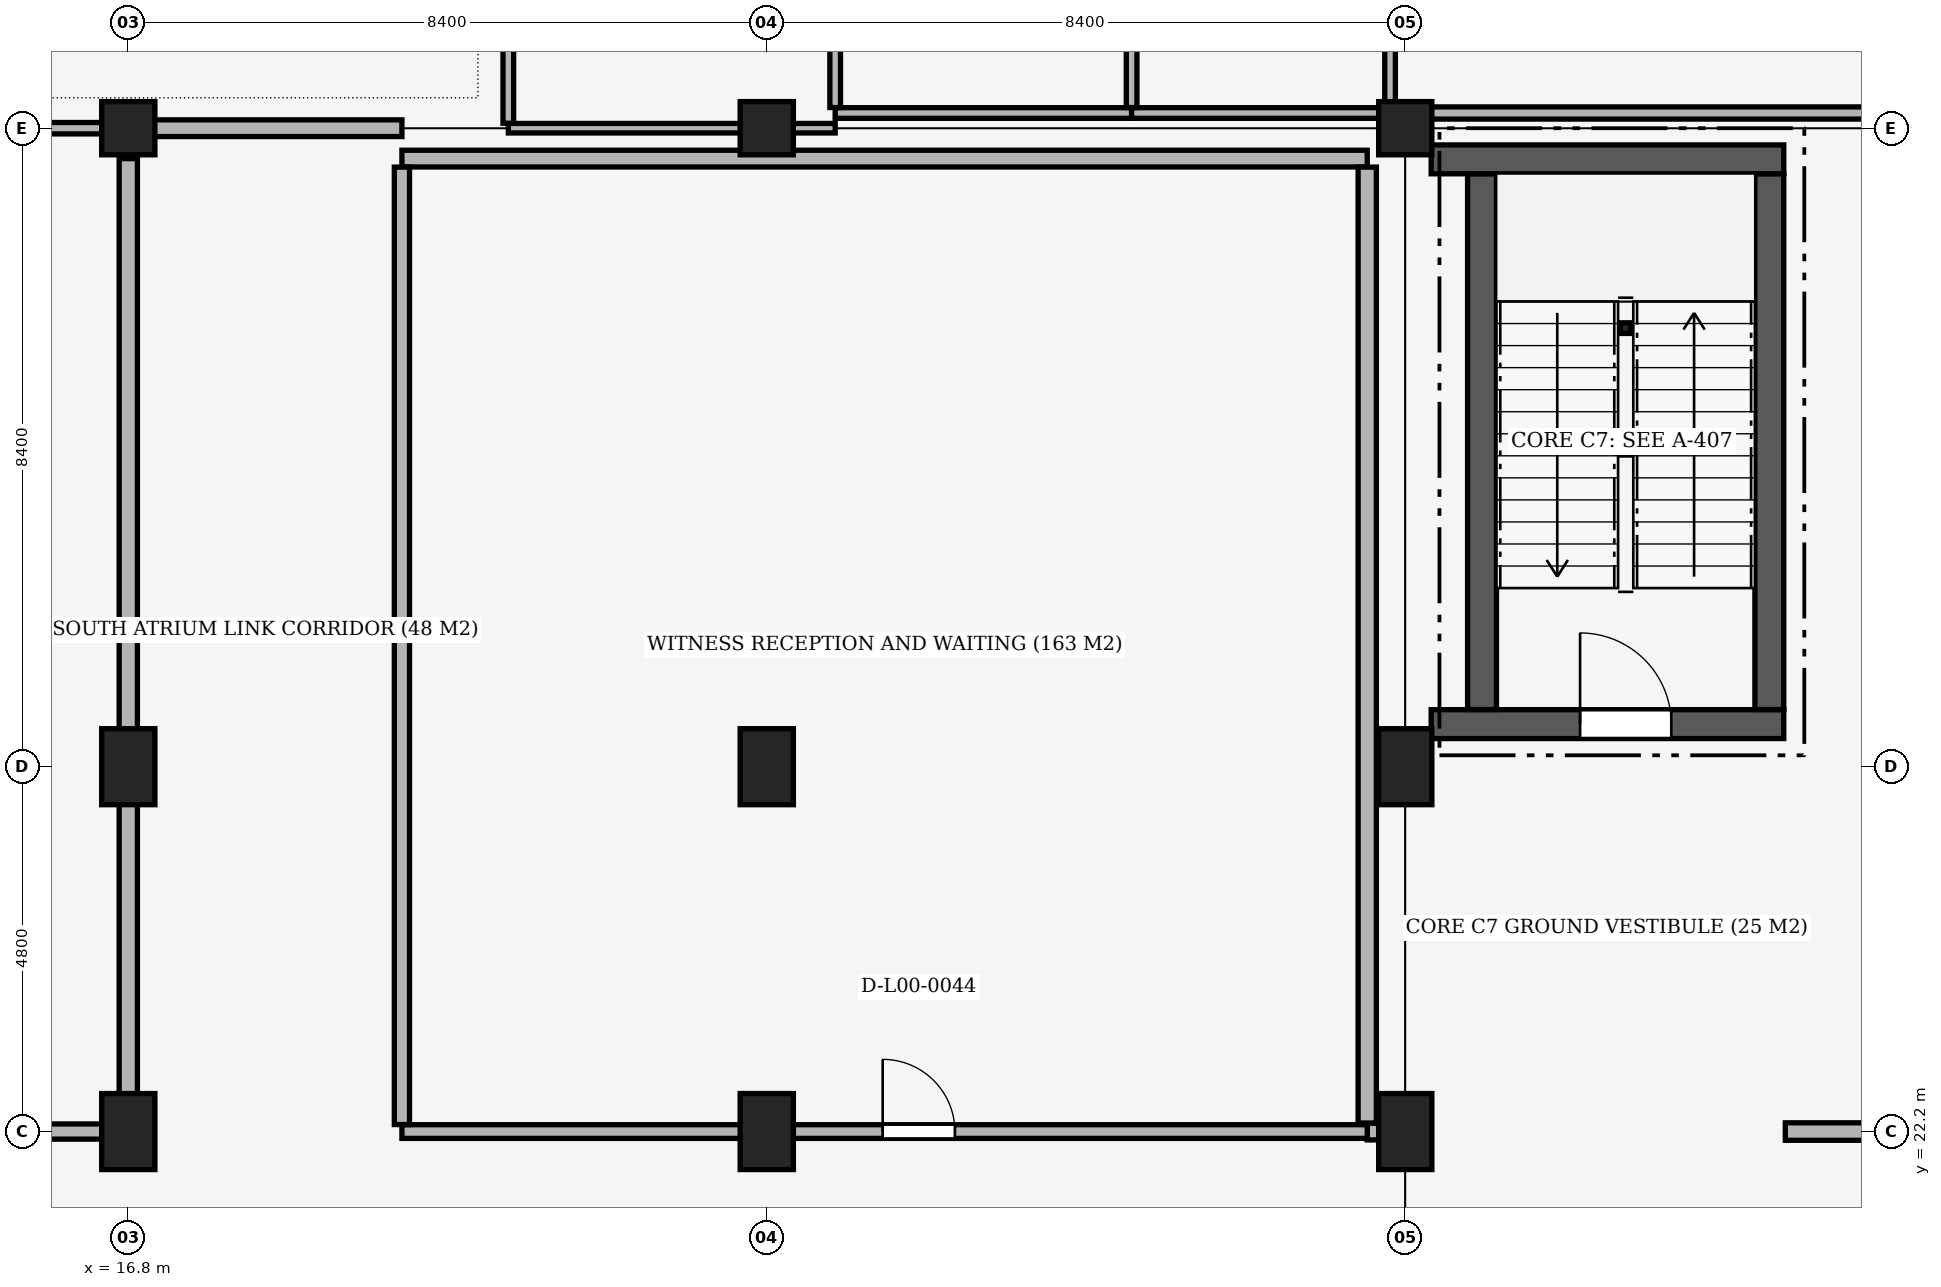
"""IFC4 building model, lengths in metres.
Left out: names, types, materials, properties, quantities, classifications, styles, units other than length and angle.
Written with IfcOpenShell. Run it as: python <this file> out.ifc"""

import sys

from ifc_helpers import new_model, si_unit, direction, frame, frame_2d, origin, origin_2d, place, context, subcontext, project, spatial, rectangle, hollow_circle, extrude, element, fill, save


model = new_model("IFC4")
c1 = context("Model", 3, precision=1e-05, world=origin(), true_north=direction((0.0, 1.0)))
c2 = subcontext(c1, "Body", "Model", "MODEL_VIEW")
j1 = project(units=[si_unit("LENGTHUNIT", "METRE"), si_unit("PLANEANGLEUNIT", "RADIAN")], contexts=[c1])
p1 = place(None, origin())
s1 = spatial("IfcSite", under=j1, at=p1, CompositionType="ELEMENT")
p2 = place(p1, origin())
s2 = spatial("IfcBuilding", under=s1, at=p2, CompositionType="ELEMENT")
p3 = place(p2, origin())
s3 = spatial("IfcBuildingStorey", under=s2, at=p3, CompositionType="ELEMENT", Elevation=0.0)
for number, where, z_axis, x_axis in (
    (1, (16.8, 22.2, 0.0), (0.0, 0.0, 1.0), (1.0, 0.0, 0.0)),
    (2, (16.8, 27.0, 0.0), (0.0, 0.0, 1.0), (1.0, 0.0, 0.0)),
):
    element("IfcColumn", number, at=place(p3, frame(where, z_axis=z_axis, x_axis=x_axis)), inside=s3, PredefinedType="COLUMN", context=c2, shape_type="SweptSolid", body=[
        extrude(rectangle(XDim=0.7, YDim=1.0, at=origin_2d()), origin(), (0.0, 0.0, 1.0), 5.1),
    ])
p4 = place(p3, frame((16.8, 35.4, 0.0), z_axis=(0.0, 0.0, 1.0), x_axis=(1.0, 0.0, 0.0)))
e3 = element("IfcColumn", 3, at=p4, inside=s3, PredefinedType="COLUMN", context=c2, shape_type="SweptSolid", body=[
    extrude(rectangle(XDim=0.7, YDim=0.7, at=origin_2d()), origin(), (0.0, 0.0, 1.0), 5.1),
])
for number, where, z_axis, x_axis in (
    (4, (25.2, 22.2, 0.0), (0.0, 0.0, 1.0), (1.0, 0.0, 0.0)),
    (5, (25.2, 27.0, 0.0), (0.0, 0.0, 1.0), (1.0, 0.0, 0.0)),
):
    element("IfcColumn", number, at=place(p3, frame(where, z_axis=z_axis, x_axis=x_axis)), inside=s3, PredefinedType="COLUMN", context=c2, shape_type="SweptSolid", body=[
        extrude(rectangle(XDim=0.7, YDim=1.0, at=origin_2d()), origin(), (0.0, 0.0, 1.0), 5.1),
    ])
p5 = place(p3, frame((25.2, 35.4, 0.0), z_axis=(0.0, 0.0, 1.0), x_axis=(1.0, 0.0, 0.0)))
e6 = element("IfcColumn", 6, at=p5, inside=s3, PredefinedType="COLUMN", context=c2, shape_type="SweptSolid", body=[
    extrude(rectangle(XDim=0.7, YDim=0.7, at=origin_2d()), origin(), (0.0, 0.0, 1.0), 5.1),
])
for number, where, z_axis, x_axis in (
    (7, (33.6, 22.2, 0.0), (0.0, 0.0, 1.0), (1.0, 0.0, 0.0)),
    (8, (33.6, 27.0, 0.0), (0.0, 0.0, 1.0), (1.0, 0.0, 0.0)),
):
    element("IfcColumn", number, at=place(p3, frame(where, z_axis=z_axis, x_axis=x_axis)), inside=s3, PredefinedType="COLUMN", context=c2, shape_type="SweptSolid", body=[
        extrude(rectangle(XDim=0.7, YDim=1.0, at=origin_2d()), origin(), (0.0, 0.0, 1.0), 5.1),
    ])
p6 = place(p3, frame((33.6, 35.4, 0.0), z_axis=(0.0, 0.0, 1.0), x_axis=(1.0, 0.0, 0.0)))
e9 = element("IfcColumn", 9, at=p6, inside=s3, PredefinedType="COLUMN", context=c2, shape_type="SweptSolid", body=[
    extrude(rectangle(XDim=0.7, YDim=0.7, at=origin_2d()), origin(), (0.0, 0.0, 1.0), 5.1),
])
for number, where, z_axis, x_axis in (
    (10, (36.5, 32.77, 0.0), (0.0, 0.0, 1.0), (1.0, 0.0, 0.0)),
    (11, (36.5, 31.17, 0.0), (0.0, 0.0, 1.0), (1.0, 0.0, 0.0)),
):
    element("IfcColumn", number, at=place(p3, frame(where, z_axis=z_axis, x_axis=x_axis)), inside=s3, PredefinedType="COLUMN", context=c2, shape_type="SweptSolid", body=[
        extrude(hollow_circle(Radius=0.07, WallThickness=0.008, at=origin_2d()), origin(), (0.0, 0.0, 1.0), 2.12),
    ])
p7 = place(p3, frame((33.941, 34.99, 0.0), z_axis=(0.0, 0.0, 1.0), x_axis=(1.0, 0.0, 0.0)))
e12 = element("IfcWall", 12, at=p7, inside=s3, PredefinedType="SHEAR", context=c2, shape_type="SweptSolid", body=[
    extrude(rectangle(XDim=4.639, YDim=0.38, at=frame_2d((2.32, 0.0))), origin(), (0.0, 0.0, 1.0), 4.82),
])
p8 = place(p3, frame((33.941, 27.56, 0.0), z_axis=(0.0, 0.0, 1.0), x_axis=(1.0, 0.0, 0.0)))
e13 = element("IfcWall", 13, at=p8, inside=s3, PredefinedType="SHEAR", context=c2, shape_type="SweptSolid", body=[
    extrude(rectangle(XDim=4.639, YDim=0.38, at=frame_2d((2.32, 0.0))), origin(), (0.0, 0.0, 1.0), 4.82),
])
p9 = place(p8, frame((1.959, 0.0, 0.0)))
e14 = element("IfcOpeningElement", 14, at=p9, cuts=e13, PredefinedType="OPENING", context=c2, shape_type="SweptSolid", body=[
    extrude(rectangle(XDim=1.2, YDim=2.2, at=frame_2d((0.6, 1.1))), frame((0.0, 0.205, 0.0), z_axis=(0.0, -1.0, 0.0), x_axis=(1.0, 0.0, 0.0)), (0.0, 0.0, 1.0), 0.41),
])
for number, where, z_axis, x_axis in (
    (15, (34.61, 27.752, 0.0), (0.0, 0.0, 1.0), (0.0, 1.0, 0.0)),
    (16, (38.39, 27.752, 0.0), (0.0, 0.0, 1.0), (0.0, 1.0, 0.0)),
):
    element("IfcWall", number, at=place(p3, frame(where, z_axis=z_axis, x_axis=x_axis)), inside=s3, PredefinedType="SHEAR", context=c2, shape_type="SweptSolid", body=[
        extrude(rectangle(XDim=7.046, YDim=0.38, at=frame_2d((3.523, 0.0))), origin(), (0.0, 0.0, 1.0), 4.82),
    ])
p10 = place(p3, frame((33.1, 22.2, 0.0), z_axis=(0.0, 0.0, 1.0), x_axis=(1.0, 0.0, 0.0)))
e17 = element("IfcWall", 17, at=p10, inside=s3, PredefinedType="PARTITIONING", context=c2, shape_type="SweptSolid", body=[
    extrude(rectangle(XDim=0.5, YDim=0.22, at=frame_2d((0.25, 0.0))), origin(), (0.0, 0.0, 1.0), 4.07),
])
p11 = place(p3, frame((0.5, 22.2, 0.0), z_axis=(0.0, 0.0, 1.0), x_axis=(1.0, 0.0, 0.0)))
e18 = element("IfcWall", 18, at=p11, inside=s3, PredefinedType="PARTITIONING", context=c2, shape_type="SweptSolid", body=[
    extrude(rectangle(XDim=16.3, YDim=0.2, at=frame_2d((8.15, 0.0))), origin(), (0.0, 0.0, 1.0), 4.07),
])
p12 = place(p11, frame((5.65, 0.0, 0.0)))
e19 = element("IfcOpeningElement", 19, at=p12, cuts=e18, PredefinedType="OPENING", context=c2, shape_type="SweptSolid", body=[
    extrude(rectangle(XDim=1.0, YDim=2.2, at=frame_2d((0.5, 1.1))), frame((0.0, 0.115, 0.0), z_axis=(0.0, -1.0, 0.0), x_axis=(1.0, 0.0, 0.0)), (0.0, 0.0, 1.0), 0.23),
])
p13 = place(p3, frame((20.4, 22.2, 0.0), z_axis=(0.0, 0.0, 1.0), x_axis=(1.0, 0.0, 0.0)))
e20 = element("IfcWall", 20, at=p13, inside=s3, PredefinedType="PARTITIONING", context=c2, shape_type="SweptSolid", body=[
    extrude(rectangle(XDim=12.7, YDim=0.18, at=frame_2d((6.35, 0.0))), origin(), (0.0, 0.0, 1.0), 4.07),
])
p14 = place(p13, frame((6.325, 0.0, 0.0)))
e21 = element("IfcOpeningElement", 21, at=p14, cuts=e20, PredefinedType="OPENING", context=c2, shape_type="SweptSolid", body=[
    extrude(rectangle(XDim=0.95, YDim=2.1, at=frame_2d((0.475, 1.05))), frame((0.0, 0.105, 0.0), z_axis=(0.0, -1.0, 0.0), x_axis=(1.0, 0.0, 0.0)), (0.0, 0.0, 1.0), 0.21),
])
p15 = place(p3, frame((38.6, 22.2, 0.0), z_axis=(0.0, 0.0, 1.0), x_axis=(1.0, 0.0, 0.0)))
e22 = element("IfcWall", 22, at=p15, inside=s3, PredefinedType="SOLIDWALL", context=c2, shape_type="SweptSolid", body=[
    extrude(rectangle(XDim=20.7, YDim=0.23, at=frame_2d((10.35, 0.0))), origin(), (0.0, 0.0, 1.0), 4.07),
])
p16 = place(p15, frame((9.425, 0.0, 0.0)))
e23 = element("IfcOpeningElement", 23, at=p16, cuts=e22, PredefinedType="OPENING", context=c2, shape_type="SweptSolid", body=[
    extrude(rectangle(XDim=0.95, YDim=2.1, at=frame_2d((0.475, 1.05))), frame((0.0, 0.13, 0.0), z_axis=(0.0, -1.0, 0.0), x_axis=(1.0, 0.0, 0.0)), (0.0, 0.0, 1.0), 0.26),
])
p17 = place(p3, frame((20.4, 35.0, 0.0), z_axis=(0.0, 0.0, 1.0), x_axis=(1.0, 0.0, 0.0)))
e24 = element("IfcWall", 24, at=p17, inside=s3, PredefinedType="PARTITIONING", context=c2, shape_type="SweptSolid", body=[
    extrude(rectangle(XDim=12.7, YDim=0.22, at=frame_2d((6.35, 0.0))), origin(), (0.0, 0.0, 1.0), 4.02),
])
p18 = place(p3, frame((16.8, 35.4, 0.0), z_axis=(0.0, 0.0, 1.0), x_axis=(1.0, 0.0, 0.0)))
e25 = element("IfcWall", 25, at=p18, inside=s3, PredefinedType="PARTITIONING", context=c2, shape_type="SweptSolid", body=[
    extrude(rectangle(XDim=3.6, YDim=0.22, at=frame_2d((1.8, 0.0))), origin(), (0.0, 0.0, 1.0), 4.07),
])
p19 = place(p3, frame((8.425, 35.4, 0.0), z_axis=(0.0, 0.0, 1.0), x_axis=(1.0, 0.0, 0.0)))
e26 = element("IfcWall", 26, at=p19, inside=s3, PredefinedType="PARTITIONING", context=c2, shape_type="SweptSolid", body=[
    extrude(rectangle(XDim=8.375, YDim=0.15, at=frame_2d((4.188, 0.0))), origin(), (0.0, 0.0, 1.0), 4.07),
])
p20 = place(p3, frame((21.8, 35.4, 0.0), z_axis=(0.0, 0.0, 1.0), x_axis=(1.0, 0.0, 0.0)))
e27 = element("IfcWall", 27, at=p20, inside=s3, PredefinedType="PARTITIONING", context=c2, shape_type="SweptSolid", body=[
    extrude(rectangle(XDim=4.3, YDim=0.125, at=frame_2d((2.15, 0.0))), origin(), (0.0, 0.0, 1.0), 4.07),
])
p21 = place(p3, frame((26.1, 35.6, 0.0), z_axis=(0.0, 0.0, 1.0), x_axis=(1.0, 0.0, 0.0)))
e28 = element("IfcWall", 28, at=p21, inside=s3, PredefinedType="PARTITIONING", context=c2, shape_type="SweptSolid", body=[
    extrude(rectangle(XDim=3.9, YDim=0.14, at=frame_2d((1.95, 0.0))), origin(), (0.0, 0.0, 1.0), 4.07),
])
p22 = place(p3, frame((30.0, 35.6, 0.0), z_axis=(0.0, 0.0, 1.0), x_axis=(1.0, 0.0, 0.0)))
e29 = element("IfcWall", 29, at=p22, inside=s3, PredefinedType="PARTITIONING", context=c2, shape_type="SweptSolid", body=[
    extrude(rectangle(XDim=3.4, YDim=0.14, at=frame_2d((1.7, 0.0))), origin(), (0.0, 0.0, 1.0), 4.07),
])
p23 = place(p3, frame((33.4, 35.6, 0.0), z_axis=(0.0, 0.0, 1.0), x_axis=(1.0, 0.0, 0.0)))
e30 = element("IfcWall", 30, at=p23, inside=s3, PredefinedType="PARTITIONING", context=c2, shape_type="SweptSolid", body=[
    extrude(rectangle(XDim=8.477, YDim=0.16, at=frame_2d((4.239, 0.0))), origin(), (0.0, 0.0, 1.0), 4.07),
])
p24 = place(p3, frame((16.8, 22.302, 0.0), z_axis=(0.0, 0.0, 1.0), x_axis=(0.0, 1.0, 0.0)))
e31 = element("IfcWall", 31, at=p24, inside=s3, PredefinedType="PARTITIONING", context=c2, shape_type="SweptSolid", body=[
    extrude(rectangle(XDim=12.698, YDim=0.24, at=frame_2d((6.349, 0.0))), origin(), (0.0, 0.0, 1.0), 4.02),
])
p25 = place(p3, frame((20.4, 22.292, 0.0), z_axis=(0.0, 0.0, 1.0), x_axis=(0.0, 1.0, 0.0)))
e32 = element("IfcWall", 32, at=p25, inside=s3, PredefinedType="PARTITIONING", context=c2, shape_type="SweptSolid", body=[
    extrude(rectangle(XDim=12.596, YDim=0.2, at=frame_2d((6.298, 0.0))), origin(), (0.0, 0.0, 1.0), 4.07),
])
p26 = place(p3, frame((21.8, 35.465, 0.0), z_axis=(0.0, 0.0, 1.0), x_axis=(0.0, 1.0, 0.0)))
e33 = element("IfcWall", 33, at=p26, inside=s3, PredefinedType="PARTITIONING", context=c2, shape_type="SweptSolid", body=[
    extrude(rectangle(XDim=13.458, YDim=0.14, at=frame_2d((6.729, 0.0))), origin(), (0.0, 0.0, 1.0), 4.07),
])
p27 = place(p26, frame((5.929, 0.0, 0.0)))
e34 = element("IfcOpeningElement", 34, at=p27, cuts=e33, PredefinedType="OPENING", context=c2, shape_type="SweptSolid", body=[
    extrude(rectangle(XDim=1.6, YDim=2.3, at=frame_2d((0.8, 1.15))), frame((0.0, 0.085, 0.0), z_axis=(0.0, -1.0, 0.0), x_axis=(1.0, 0.0, 0.0)), (0.0, 0.0, 1.0), 0.17),
])
p28 = place(p3, frame((26.1, 35.672, 0.0), z_axis=(0.0, 0.0, 1.0), x_axis=(0.0, 1.0, 0.0)))
e35 = element("IfcWall", 35, at=p28, inside=s3, PredefinedType="PARTITIONING", context=c2, shape_type="SweptSolid", body=[
    extrude(rectangle(XDim=3.328, YDim=0.14, at=frame_2d((1.664, 0.0))), origin(), (0.0, 0.0, 1.0), 4.07),
])
p29 = place(p28, frame((1.214, 0.0, 0.0)))
e36 = element("IfcOpeningElement", 36, at=p29, cuts=e35, PredefinedType="OPENING", context=c2, shape_type="SweptSolid", body=[
    extrude(rectangle(XDim=0.9, YDim=2.1, at=frame_2d((0.45, 1.05))), frame((0.0, 0.085, 0.0), z_axis=(0.0, -1.0, 0.0), x_axis=(1.0, 0.0, 0.0)), (0.0, 0.0, 1.0), 0.17),
])
p30 = place(p3, frame((30.0, 35.672, 0.0), z_axis=(0.0, 0.0, 1.0), x_axis=(0.0, 1.0, 0.0)))
e37 = element("IfcWall", 37, at=p30, inside=s3, PredefinedType="PARTITIONING", context=c2, shape_type="SweptSolid", body=[
    extrude(rectangle(XDim=3.256, YDim=0.14, at=frame_2d((1.628, 0.0))), origin(), (0.0, 0.0, 1.0), 4.07),
])
p31 = place(p3, frame((33.1, 22.312, 0.0), z_axis=(0.0, 0.0, 1.0), x_axis=(0.0, 1.0, 0.0)))
e38 = element("IfcWall", 38, at=p31, inside=s3, PredefinedType="PARTITIONING", context=c2, shape_type="SweptSolid", body=[
    extrude(rectangle(XDim=12.576, YDim=0.24, at=frame_2d((6.288, 0.0))), origin(), (0.0, 0.0, 1.0), 4.07),
])
p32 = place(p3, frame((33.4, 35.682, 0.0), z_axis=(0.0, 0.0, 1.0), x_axis=(0.0, 1.0, 0.0)))
e39 = element("IfcWall", 39, at=p32, inside=s3, PredefinedType="PARTITIONING", context=c2, shape_type="SweptSolid", body=[
    extrude(rectangle(XDim=3.246, YDim=0.14, at=frame_2d((1.623, 0.0))), origin(), (0.0, 0.0, 1.0), 4.17),
])
p33 = place(p32, frame((1.173, 0.0, 0.0)))
e40 = element("IfcOpeningElement", 40, at=p33, cuts=e39, PredefinedType="OPENING", context=c2, shape_type="SweptSolid", body=[
    extrude(rectangle(XDim=0.9, YDim=2.1, at=frame_2d((0.45, 1.05))), frame((0.0, 0.085, 0.0), z_axis=(0.0, -1.0, 0.0), x_axis=(1.0, 0.0, 0.0)), (0.0, 0.0, 1.0), 0.17),
])
p34 = place(p9, origin())
e41 = element("IfcDoor", 41, at=p34, inside=s3, OperationType="SINGLE_SWING_LEFT", PredefinedType="DOOR", context=c2, shape_type="SweptSolid", body=[
    extrude(rectangle(XDim=1.2, YDim=2.2, at=frame_2d((0.6, 1.1))), frame((0.0, 0.025, 0.0), z_axis=(0.0, -1.0, 0.0), x_axis=(1.0, 0.0, 0.0)), (0.0, 0.0, 1.0), 0.05),
])
fill(e14, e41)
p35 = place(p14, origin())
e42 = element("IfcDoor", 42, at=p35, inside=s3, OperationType="SINGLE_SWING_LEFT", PredefinedType="DOOR", context=c2, shape_type="SweptSolid", body=[
    extrude(rectangle(XDim=0.95, YDim=2.1, at=frame_2d((0.475, 1.05))), frame((0.0, 0.025, 0.0), z_axis=(0.0, -1.0, 0.0), x_axis=(1.0, 0.0, 0.0)), (0.0, 0.0, 1.0), 0.05),
])
fill(e21, e42)
save(model, sys.argv[1])
